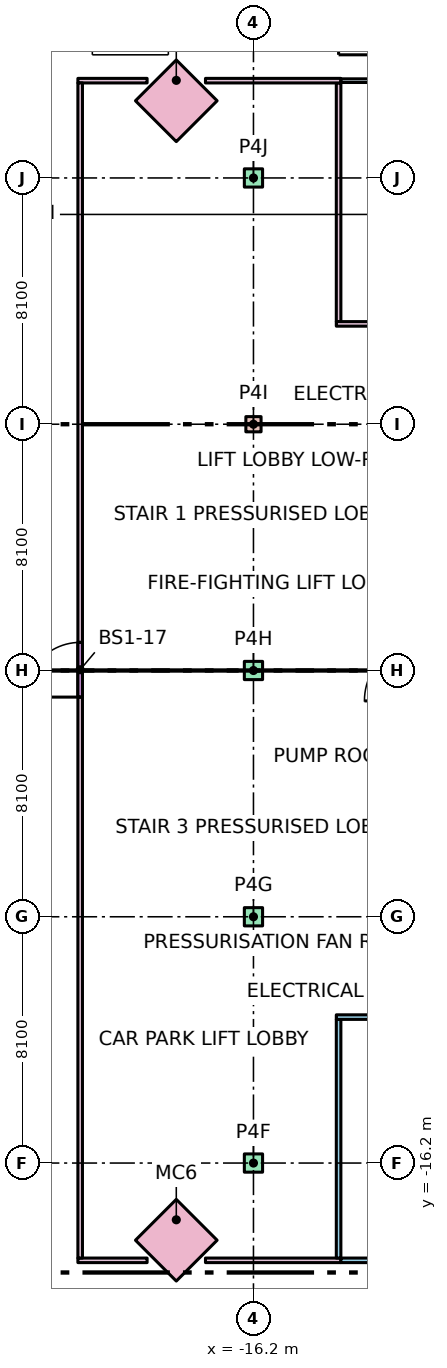
"""IFC4 building model, lengths in metres.
Left out: names, types, materials, properties, quantities, classifications, styles, units other than length and angle.
Written with IfcOpenShell. Run it as: python <this file> out.ifc"""

import sys

from ifc_helpers import new_model, si_unit, direction, frame, frame_2d, origin, origin_2d, place, context, subcontext, project, spatial, rectangle, extrude, element, fill, save


model = new_model("IFC4")
c1 = context("Model", 3, precision=1e-05, world=origin(), true_north=direction((0.0, 1.0)))
c2 = subcontext(c1, "Body", "Model", "MODEL_VIEW")
j1 = project(units=[si_unit("LENGTHUNIT", "METRE"), si_unit("PLANEANGLEUNIT", "RADIAN")], contexts=[c1])
p1 = place(None, origin())
s1 = spatial("IfcSite", under=j1, at=p1, CompositionType="ELEMENT")
p2 = place(p1, origin())
s2 = spatial("IfcBuilding", under=s1, at=p2, CompositionType="ELEMENT")
p3 = place(p2, frame((0.0, 0.0, -3.6)))
s3 = spatial("IfcBuildingStorey", under=s2, at=p3, CompositionType="ELEMENT", Elevation=-3.6)
for number, where, z_axis, x_axis in (
    (1, (-16.2, -16.2, 0.0), (0.0, 0.0, 1.0), (1.0, 0.0, 0.0)),
    (2, (-16.2, -8.1, 0.0), (0.0, 0.0, 1.0), (1.0, 0.0, 0.0)),
    (3, (-16.2, 0.0, 0.0), (0.0, 0.0, 1.0), (1.0, 0.0, 0.0)),
):
    element("IfcColumn", number, at=place(p3, frame(where, z_axis=z_axis, x_axis=x_axis)), inside=s3, PredefinedType="COLUMN", context=c2, shape_type="SweptSolid", body=[
        extrude(rectangle(XDim=0.6, YDim=0.6, at=origin_2d()), origin(), (0.0, 0.0, 1.0), 3.6),
    ])
p4 = place(p3, frame((-16.2, 8.1, 0.0), z_axis=(0.0, 0.0, 1.0), x_axis=(1.0, 0.0, 0.0)))
e4 = element("IfcColumn", 4, at=p4, inside=s3, PredefinedType="COLUMN", context=c2, shape_type="SweptSolid", body=[
    extrude(rectangle(XDim=0.5, YDim=0.5, at=origin_2d()), origin(), (0.0, 0.0, 1.0), 3.6),
])
p5 = place(p3, frame((-16.2, 16.2, 0.0), z_axis=(0.0, 0.0, 1.0), x_axis=(1.0, 0.0, 0.0)))
e5 = element("IfcColumn", 5, at=p5, inside=s3, PredefinedType="COLUMN", context=c2, shape_type="SweptSolid", body=[
    extrude(rectangle(XDim=0.6, YDim=0.6, at=origin_2d()), origin(), (0.0, 0.0, 1.0), 3.6),
])
for number, where, z_axis, x_axis in (
    (6, (-18.738, 18.738, 0.0), (0.0, 0.0, 1.0), (-0.707, -0.707, 0.0)),
    (7, (-18.738, -18.738, 0.0), (0.0, 0.0, 1.0), (0.707, -0.707, 0.0)),
):
    element("IfcColumn", number, at=place(p3, frame(where, z_axis=z_axis, x_axis=x_axis)), inside=s3, PredefinedType="COLUMN", context=c2, shape_type="SweptSolid", body=[
        extrude(rectangle(XDim=1.9, YDim=1.9, at=origin_2d()), origin(), (0.0, 0.0, 1.0), 3.6),
    ])
p6 = place(p3, frame((-13.4, 11.475, 0.0), z_axis=(0.0, 0.0, 1.0), x_axis=(0.0, 1.0, 0.0)))
e8 = element("IfcWall", 8, at=p6, inside=s3, PredefinedType="PARTITIONING", context=c2, shape_type="SweptSolid", body=[
    extrude(rectangle(XDim=7.85, YDim=0.15, at=frame_2d((3.925, 0.0))), origin(), (0.0, 0.0, 1.0), 3.15),
])
p7 = place(p3, frame((-21.975, -19.4, 0.0), z_axis=(0.0, 0.0, 1.0), x_axis=(1.0, 0.0, 0.0)))
e9 = element("IfcWall", 9, at=p7, inside=s3, PredefinedType="PARTITIONING", context=c2, shape_type="SweptSolid", body=[
    extrude(rectangle(XDim=2.277, YDim=0.15, at=frame_2d((1.138, 0.0))), origin(), (0.0, 0.0, 1.0), 3.15),
])
p8 = place(p3, frame((-17.778, -19.4, 0.0), z_axis=(0.0, 0.0, 1.0), x_axis=(1.0, 0.0, 0.0)))
e10 = element("IfcWall", 10, at=p8, inside=s3, PredefinedType="PARTITIONING", context=c2, shape_type="SweptSolid", body=[
    extrude(rectangle(XDim=4.453, YDim=0.15, at=frame_2d((2.227, 0.0))), origin(), (0.0, 0.0, 1.0), 3.15),
])
p9 = place(p3, frame((-21.975, 19.4, 0.0), z_axis=(0.0, 0.0, 1.0), x_axis=(1.0, 0.0, 0.0)))
e11 = element("IfcWall", 11, at=p9, inside=s3, PredefinedType="PARTITIONING", context=c2, shape_type="SweptSolid", body=[
    extrude(rectangle(XDim=2.277, YDim=0.15, at=frame_2d((1.138, 0.0))), origin(), (0.0, 0.0, 1.0), 3.15),
])
p10 = place(p3, frame((-17.778, 19.4, 0.0), z_axis=(0.0, 0.0, 1.0), x_axis=(1.0, 0.0, 0.0)))
e12 = element("IfcWall", 12, at=p10, inside=s3, PredefinedType="PARTITIONING", context=c2, shape_type="SweptSolid", body=[
    extrude(rectangle(XDim=4.453, YDim=0.15, at=frame_2d((2.227, 0.0))), origin(), (0.0, 0.0, 1.0), 3.15),
])
p11 = place(p3, frame((-21.9, -19.325, 0.0), z_axis=(0.0, 0.0, 1.0), x_axis=(0.0, 1.0, 0.0)))
e13 = element("IfcWall", 13, at=p11, inside=s3, PredefinedType="PARTITIONING", context=c2, shape_type="SweptSolid", body=[
    extrude(rectangle(XDim=38.65, YDim=0.15, at=frame_2d((19.325, 0.0))), origin(), (0.0, 0.0, 1.0), 3.15),
])
p12 = place(p11, frame((18.45, 0.0, 0.0)))
e14 = element("IfcOpeningElement", 14, at=p12, cuts=e13, PredefinedType="OPENING", context=c2, shape_type="SweptSolid", body=[
    extrude(rectangle(XDim=1.8, YDim=2.4, at=frame_2d((0.9, 1.2))), frame((0.0, 0.085, 0.0), z_axis=(0.0, -1.0, 0.0), x_axis=(1.0, 0.0, 0.0)), (0.0, 0.0, 1.0), 0.17),
])
p13 = place(p3, frame((-13.4, -19.325, 0.0), z_axis=(0.0, 0.0, 1.0), x_axis=(0.0, 1.0, 0.0)))
e15 = element("IfcWall", 15, at=p13, inside=s3, PredefinedType="PARTITIONING", context=c2, shape_type="SweptSolid", body=[
    extrude(rectangle(XDim=7.85, YDim=0.15, at=frame_2d((3.925, 0.0))), origin(), (0.0, 0.0, 1.0), 3.15),
])
p14 = place(p3, frame((-13.325, 19.4, 0.0), z_axis=(0.0, 0.0, 1.0), x_axis=(1.0, 0.0, 0.0)))
e16 = element("IfcWall", 16, at=p14, inside=s3, PredefinedType="PARTITIONING", context=c2, shape_type="SweptSolid", body=[
    extrude(rectangle(XDim=6.006, YDim=0.12, at=frame_2d((3.003, 0.0))), origin(), (0.0, 0.0, 1.0), 3.15),
])
p15 = place(p3, frame((-13.475, 11.4, 0.0), z_axis=(0.0, 0.0, 1.0), x_axis=(1.0, 0.0, 0.0)))
e17 = element("IfcWall", 17, at=p15, inside=s3, PredefinedType="PARTITIONING", context=c2, shape_type="SweptSolid", body=[
    extrude(rectangle(XDim=6.156, YDim=0.15, at=frame_2d((3.078, 0.0))), origin(), (0.0, 0.0, 1.0), 3.15),
])
p16 = place(p15, frame((2.55, 0.0, 0.0)))
e18 = element("IfcOpeningElement", 18, at=p16, cuts=e17, PredefinedType="OPENING", context=c2, shape_type="SweptSolid", body=[
    extrude(rectangle(XDim=1.0, YDim=2.1, at=frame_2d((0.5, 1.05))), frame((0.0, 0.085, 0.0), z_axis=(0.0, -1.0, 0.0), x_axis=(1.0, 0.0, 0.0)), (0.0, 0.0, 1.0), 0.17),
])
p17 = place(p3, frame((-13.325, -19.4, 0.0), z_axis=(0.0, 0.0, 1.0), x_axis=(1.0, 0.0, 0.0)))
e19 = element("IfcWall", 19, at=p17, inside=s3, PredefinedType="PARTITIONING", context=c2, shape_type="SweptSolid", body=[
    extrude(rectangle(XDim=13.45, YDim=0.15, at=frame_2d((6.725, 0.0))), origin(), (0.0, 0.0, 1.0), 3.15),
])
p18 = place(p17, frame((10.425, 0.0, 0.0)))
e20 = element("IfcOpeningElement", 20, at=p18, cuts=e19, PredefinedType="OPENING", context=c2, shape_type="SweptSolid", body=[
    extrude(rectangle(XDim=1.0, YDim=2.1, at=frame_2d((0.5, 1.05))), frame((0.0, 0.085, 0.0), z_axis=(0.0, -1.0, 0.0), x_axis=(1.0, 0.0, 0.0)), (0.0, 0.0, 1.0), 0.17),
])
p19 = place(p3, frame((-13.475, -11.4, 0.0), z_axis=(0.0, 0.0, 1.0), x_axis=(1.0, 0.0, 0.0)))
e21 = element("IfcWall", 21, at=p19, inside=s3, PredefinedType="PARTITIONING", context=c2, shape_type="SweptSolid", body=[
    extrude(rectangle(XDim=13.6, YDim=0.15, at=frame_2d((6.8, 0.0))), origin(), (0.0, 0.0, 1.0), 3.15),
])
p20 = place(p19, frame((3.75, 0.0, 0.0)))
e22 = element("IfcOpeningElement", 22, at=p20, cuts=e21, PredefinedType="OPENING", context=c2, shape_type="SweptSolid", body=[
    extrude(rectangle(XDim=1.0, YDim=2.1, at=frame_2d((0.5, 1.05))), frame((0.0, 0.085, 0.0), z_axis=(0.0, -1.0, 0.0), x_axis=(1.0, 0.0, 0.0)), (0.0, 0.0, 1.0), 0.17),
])
p21 = place(p12, origin())
e23 = element("IfcDoor", 23, at=p21, inside=s3, OperationType="SINGLE_SWING_LEFT", PredefinedType="DOOR", context=c2, shape_type="SweptSolid", body=[
    extrude(rectangle(XDim=1.8, YDim=2.4, at=frame_2d((0.9, 1.2))), frame((0.0, 0.025, 0.0), z_axis=(0.0, -1.0, 0.0), x_axis=(1.0, 0.0, 0.0)), (0.0, 0.0, 1.0), 0.05),
])
fill(e14, e23)
save(model, sys.argv[1])
